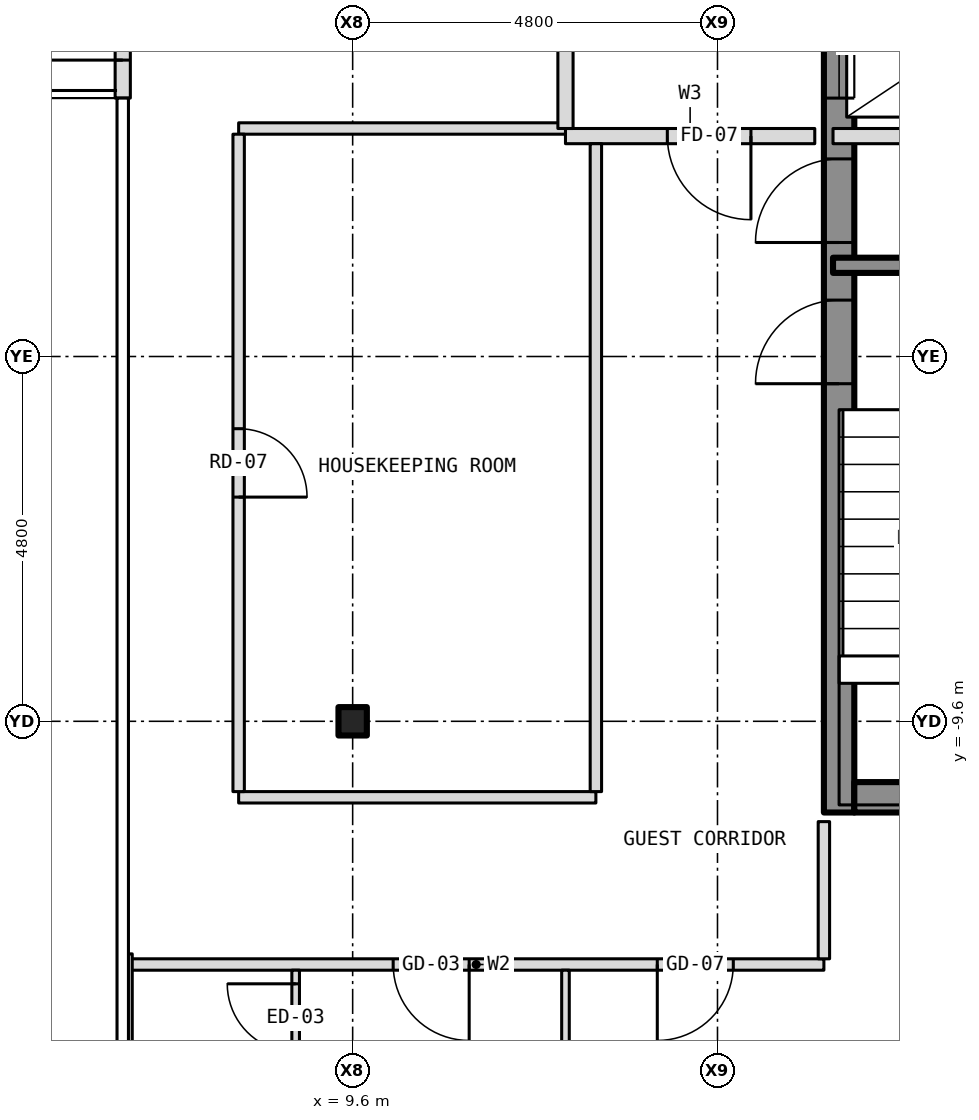
"""IFC4 building model, lengths in metres.
Left out: names, types, materials, properties, quantities, classifications, styles, units other than length and angle.
Written with IfcOpenShell. Run it as: python <this file> out.ifc"""

import sys

from ifc_helpers import new_model, si_unit, direction, frame, frame_2d, origin, origin_2d, place, context, subcontext, project, spatial, rectangle, i_section, extrude, element, fill, save


model = new_model("IFC4")
c1 = context("Model", 3, precision=1e-05, world=origin(), true_north=direction((0.0, 1.0)))
c2 = subcontext(c1, "Body", "Model", "MODEL_VIEW")
j1 = project(units=[si_unit("LENGTHUNIT", "METRE"), si_unit("PLANEANGLEUNIT", "RADIAN")], contexts=[c1])
p1 = place(None, origin())
s1 = spatial("IfcSite", under=j1, at=p1, CompositionType="ELEMENT")
p2 = place(p1, origin())
s2 = spatial("IfcBuilding", under=s1, at=p2, CompositionType="ELEMENT")
p3 = place(p2, frame((0.0, 0.0, 222.5)))
s3 = spatial("IfcBuildingStorey", under=s2, at=p3, CompositionType="ELEMENT", Elevation=222.5)
p4 = place(p3, frame((9.6, -9.6, -0.15), z_axis=(0.0, 0.0, 1.0), x_axis=(1.0, 0.0, 0.0)))
e1 = element("IfcColumn", 1, at=p4, inside=s3, PredefinedType="COLUMN", context=c2, shape_type="SweptSolid", body=[
    extrude(i_section(OverallWidth=0.373, OverallDepth=0.373, WebThickness=0.016, FlangeThickness=0.026, at=origin_2d()), origin(), (0.0, 0.0, 1.0), 3.5),
])
p5 = place(p3, frame((16.0, -10.8, 0.0), z_axis=(0.0, 0.0, 1.0), x_axis=(0.0, 1.0, 0.0)))
e2 = element("IfcWall", 2, at=p5, inside=s3, PredefinedType="SHEAR", context=c2, shape_type="SweptSolid", body=[
    extrude(rectangle(XDim=21.6, YDim=0.4, at=frame_2d((10.8, 0.0))), origin(), (0.0, 0.0, 1.0), 3.25),
])
p6 = place(p5, frame((9.4, 0.0, 0.0)))
e3 = element("IfcOpeningElement", 3, at=p6, cuts=e2, PredefinedType="OPENING", context=c2, shape_type="SweptSolid", body=[
    extrude(rectangle(XDim=1.1, YDim=2.1, at=frame_2d((0.55, 1.05))), frame((0.0, 0.212, 0.0), z_axis=(0.0, -1.0, 0.0), x_axis=(1.0, 0.0, 0.0)), (0.0, 0.0, 1.0), 0.424),
])
p7 = place(p5, frame((11.5, 0.0, 0.0)))
e4 = element("IfcOpeningElement", 4, at=p7, cuts=e2, PredefinedType="OPENING", context=c2, shape_type="SweptSolid", body=[
    extrude(rectangle(XDim=1.1, YDim=2.1, at=frame_2d((0.55, 1.05))), frame((0.0, 0.212, 0.0), z_axis=(0.0, -1.0, 0.0), x_axis=(1.0, 0.0, 0.0)), (0.0, 0.0, 1.0), 0.424),
])
p8 = place(p5, frame((13.6, 0.0, 0.0)))
e5 = element("IfcOpeningElement", 5, at=p8, cuts=e2, PredefinedType="OPENING", context=c2, shape_type="SweptSolid", body=[
    extrude(rectangle(XDim=1.1, YDim=2.1, at=frame_2d((0.55, 1.05))), frame((0.0, 0.212, 0.0), z_axis=(0.0, -1.0, 0.0), x_axis=(1.0, 0.0, 0.0)), (0.0, 0.0, 1.0), 0.424),
])
p9 = place(p5, frame((15.7, 0.0, 0.0)))
e6 = element("IfcOpeningElement", 6, at=p9, cuts=e2, PredefinedType="OPENING", context=c2, shape_type="SweptSolid", body=[
    extrude(rectangle(XDim=1.1, YDim=2.1, at=frame_2d((0.55, 1.05))), frame((0.0, 0.212, 0.0), z_axis=(0.0, -1.0, 0.0), x_axis=(1.0, 0.0, 0.0)), (0.0, 0.0, 1.0), 0.424),
])
p10 = place(p5, frame((17.8, 0.0, 0.0)))
e7 = element("IfcOpeningElement", 7, at=p10, cuts=e2, PredefinedType="OPENING", context=c2, shape_type="SweptSolid", body=[
    extrude(rectangle(XDim=1.1, YDim=2.1, at=frame_2d((0.55, 1.05))), frame((0.0, 0.212, 0.0), z_axis=(0.0, -1.0, 0.0), x_axis=(1.0, 0.0, 0.0)), (0.0, 0.0, 1.0), 0.424),
])
p11 = place(p5, frame((5.642, 0.0, 0.0)))
e8 = element("IfcOpeningElement", 8, at=p11, cuts=e2, PredefinedType="OPENING", context=c2, shape_type="SweptSolid", body=[
    extrude(rectangle(XDim=1.1, YDim=2.1, at=frame_2d((0.55, 1.05))), frame((0.0, 0.212, 0.0), z_axis=(0.0, -1.0, 0.0), x_axis=(1.0, 0.0, 0.0)), (0.0, 0.0, 1.0), 0.424),
])
p12 = place(p5, frame((7.5, 0.0, 0.0)))
e9 = element("IfcOpeningElement", 9, at=p12, cuts=e2, PredefinedType="OPENING", context=c2, shape_type="SweptSolid", body=[
    extrude(rectangle(XDim=1.1, YDim=2.1, at=frame_2d((0.55, 1.05))), frame((0.0, 0.212, 0.0), z_axis=(0.0, -1.0, 0.0), x_axis=(1.0, 0.0, 0.0)), (0.0, 0.0, 1.0), 0.424),
])
p13 = place(p5, frame((20.0, 0.0, 0.0)))
e10 = element("IfcOpeningElement", 10, at=p13, cuts=e2, PredefinedType="OPENING", context=c2, shape_type="SweptSolid", body=[
    extrude(rectangle(XDim=0.9, YDim=2.1, at=frame_2d((0.45, 1.05))), frame((0.0, 0.212, 0.0), z_axis=(0.0, -1.0, 0.0), x_axis=(1.0, 0.0, 0.0)), (0.0, 0.0, 1.0), 0.424),
])
p14 = place(p3, frame((16.2, -10.6, 0.0), z_axis=(0.0, 0.0, 1.0), x_axis=(1.0, 0.0, 0.0)))
e11 = element("IfcWall", 11, at=p14, inside=s3, PredefinedType="SHEAR", context=c2, shape_type="SweptSolid", body=[
    extrude(rectangle(XDim=3.8, YDim=0.4, at=frame_2d((1.9, 0.0))), origin(), (0.0, 0.0, 1.0), 3.25),
])
p15 = place(p3, frame((6.575, -1.4, 0.0), z_axis=(0.0, 0.0, 1.0), x_axis=(0.0, 1.0, 0.0)))
e12 = element("IfcWall", 12, at=p15, inside=s3, PredefinedType="SOLIDWALL", context=c2, shape_type="SweptSolid", body=[
    extrude(rectangle(XDim=2.8, YDim=0.2, at=frame_2d((1.4, 0.0))), origin(), (0.0, 0.0, 1.0), 3.5),
])
p16 = place(p15, frame((0.5, 0.0, 0.0)))
e13 = element("IfcOpeningElement", 13, at=p16, cuts=e12, PredefinedType="OPENING", context=c2, shape_type="SweptSolid", body=[
    extrude(rectangle(XDim=1.8, YDim=2.1, at=frame_2d((0.9, 1.05))), frame((0.0, 0.112, 0.0), z_axis=(0.0, -1.0, 0.0), x_axis=(1.0, 0.0, 0.0)), (0.0, 0.0, 1.0), 0.224),
])
p17 = place(p3, frame((6.65, -12.8, 0.0), z_axis=(0.0, 0.0, 1.0), x_axis=(1.0, 0.0, 0.0)))
e14 = element("IfcWall", 14, at=p17, inside=s3, PredefinedType="PARTITIONING", context=c2, shape_type="SweptSolid", body=[
    extrude(rectangle(XDim=9.15, YDim=0.15, at=frame_2d((4.575, 0.0))), origin(), (0.0, 0.0, 1.0), 3.35),
])
p18 = place(p17, frame((3.483, 0.0, 0.0)))
e15 = element("IfcOpeningElement", 15, at=p18, cuts=e14, PredefinedType="OPENING", context=c2, shape_type="SweptSolid", body=[
    extrude(rectangle(XDim=1.0, YDim=2.1, at=frame_2d((0.5, 1.05))), frame((0.0, 0.087, 0.0), z_axis=(0.0, -1.0, 0.0), x_axis=(1.0, 0.0, 0.0)), (0.0, 0.0, 1.0), 0.174),
])
p19 = place(p17, frame((6.958, 0.0, 0.0)))
e16 = element("IfcOpeningElement", 16, at=p19, cuts=e14, PredefinedType="OPENING", context=c2, shape_type="SweptSolid", body=[
    extrude(rectangle(XDim=1.0, YDim=2.1, at=frame_2d((0.5, 1.05))), frame((0.0, 0.087, 0.0), z_axis=(0.0, -1.0, 0.0), x_axis=(1.0, 0.0, 0.0)), (0.0, 0.0, 1.0), 0.174),
])
p20 = place(p3, frame((8.1, -10.6, 0.0), z_axis=(0.0, 0.0, 1.0), x_axis=(1.0, 0.0, 0.0)))
e17 = element("IfcWall", 17, at=p20, inside=s3, PredefinedType="PARTITIONING", context=c2, shape_type="SweptSolid", body=[
    extrude(rectangle(XDim=4.7, YDim=0.15, at=frame_2d((2.35, 0.0))), origin(), (0.0, 0.0, 1.0), 3.35),
])
p21 = place(p3, frame((15.92, -3.6, 0.0), z_axis=(0.0, 0.0, 1.0), x_axis=(1.0, 0.0, 0.0)))
e18 = element("IfcWall", 18, at=p21, inside=s3, PredefinedType="SHEAR", context=c2, shape_type="SweptSolid", body=[
    extrude(rectangle(XDim=4.36, YDim=0.2, at=frame_2d((2.18, 0.0))), origin(), (0.0, 0.0, 1.0), 3.25),
])
p22 = place(p3, frame((12.4, -1.9, 0.0), z_axis=(0.0, 0.0, 1.0), x_axis=(1.0, 0.0, 0.0)))
e19 = element("IfcWall", 19, at=p22, inside=s3, PredefinedType="PARTITIONING", context=c2, shape_type="SweptSolid", body=[
    extrude(rectangle(XDim=3.28, YDim=0.2, at=frame_2d((1.64, 0.0))), origin(), (0.0, 0.0, 1.0), 3.35),
])
p23 = place(p22, frame((1.34, 0.0, 0.0)))
e20 = element("IfcOpeningElement", 20, at=p23, cuts=e19, PredefinedType="OPENING", context=c2, shape_type="SweptSolid", body=[
    extrude(rectangle(XDim=1.1, YDim=2.1, at=frame_2d((0.55, 1.05))), frame((0.0, 0.112, 0.0), z_axis=(0.0, -1.0, 0.0), x_axis=(1.0, 0.0, 0.0)), (0.0, 0.0, 1.0), 0.224),
])
p24 = place(p3, frame((15.92, -1.9, 0.0), z_axis=(0.0, 0.0, 1.0), x_axis=(1.0, 0.0, 0.0)))
e21 = element("IfcWall", 21, at=p24, inside=s3, PredefinedType="PARTITIONING", context=c2, shape_type="SweptSolid", body=[
    extrude(rectangle(XDim=4.36, YDim=0.2, at=frame_2d((2.18, 0.0))), origin(), (0.0, 0.0, 1.0), 3.25),
])
p25 = place(p24, frame((3.18, 0.0, 0.0)))
e22 = element("IfcOpeningElement", 22, at=p25, cuts=e21, PredefinedType="OPENING", context=c2, shape_type="SweptSolid", body=[
    extrude(rectangle(XDim=0.9, YDim=2.1, at=frame_2d((0.45, 1.05))), frame((0.0, 0.112, 0.0), z_axis=(0.0, -1.0, 0.0), x_axis=(1.0, 0.0, 0.0)), (0.0, 0.0, 1.0), 0.224),
])
p26 = place(p3, frame((8.1, -1.8, 0.0), z_axis=(0.0, 0.0, 1.0), x_axis=(1.0, 0.0, 0.0)))
e23 = element("IfcWall", 23, at=p26, inside=s3, PredefinedType="PARTITIONING", context=c2, shape_type="SweptSolid", body=[
    extrude(rectangle(XDim=4.3, YDim=0.15, at=frame_2d((2.15, 0.0))), origin(), (0.0, 0.0, 1.0), 3.35),
])
p27 = place(p3, frame((6.65, -16.14, 0.0), z_axis=(0.0, 0.0, 1.0), x_axis=(0.0, 1.0, 0.0)))
e24 = element("IfcWall", 24, at=p27, inside=s3, PredefinedType="PARTITIONING", context=c2, shape_type="SweptSolid", body=[
    extrude(rectangle(XDim=3.48, YDim=0.1, at=frame_2d((1.74, 0.0))), origin(), (0.0, 0.0, 1.0), 3.35),
])
p28 = place(p3, frame((8.1, -10.525, 0.0), z_axis=(0.0, 0.0, 1.0), x_axis=(0.0, 1.0, 0.0)))
e25 = element("IfcWall", 25, at=p28, inside=s3, PredefinedType="PARTITIONING", context=c2, shape_type="SweptSolid", body=[
    extrude(rectangle(XDim=8.65, YDim=0.15, at=frame_2d((4.325, 0.0))), origin(), (0.0, 0.0, 1.0), 3.35),
])
p29 = place(p28, frame((3.875, 0.0, 0.0)))
e26 = element("IfcOpeningElement", 26, at=p29, cuts=e25, PredefinedType="OPENING", context=c2, shape_type="SweptSolid", body=[
    extrude(rectangle(XDim=0.9, YDim=2.1, at=frame_2d((0.45, 1.05))), frame((0.0, 0.087, 0.0), z_axis=(0.0, -1.0, 0.0), x_axis=(1.0, 0.0, 0.0)), (0.0, 0.0, 1.0), 0.174),
])
p30 = place(p3, frame((8.85, -15.95, 0.0), z_axis=(0.0, 0.0, 1.0), x_axis=(0.0, 1.0, 0.0)))
e27 = element("IfcWall", 27, at=p30, inside=s3, PredefinedType="PARTITIONING", context=c2, shape_type="SweptSolid", body=[
    extrude(rectangle(XDim=3.075, YDim=0.1, at=frame_2d((1.538, 0.0))), origin(), (0.0, 0.0, 1.0), 3.35),
])
p31 = place(p30, frame((1.996, 0.0, 0.0)))
e28 = element("IfcOpeningElement", 28, at=p31, cuts=e27, PredefinedType="OPENING", context=c2, shape_type="SweptSolid", body=[
    extrude(rectangle(XDim=0.9, YDim=2.1, at=frame_2d((0.45, 1.05))), frame((0.0, 0.062, 0.0), z_axis=(0.0, -1.0, 0.0), x_axis=(1.0, 0.0, 0.0)), (0.0, 0.0, 1.0), 0.124),
])
p32 = place(p3, frame((12.4, -20.78, 0.0), z_axis=(0.0, 0.0, 1.0), x_axis=(0.0, 1.0, 0.0)))
e29 = element("IfcWall", 29, at=p32, inside=s3, PredefinedType="PARTITIONING", context=c2, shape_type="SweptSolid", body=[
    extrude(rectangle(XDim=7.905, YDim=0.1, at=frame_2d((3.953, 0.0))), origin(), (0.0, 0.0, 1.0), 3.35),
])
p33 = place(p3, frame((12.4, -1.8, 0.0), z_axis=(0.0, 0.0, 1.0), x_axis=(0.0, 1.0, 0.0)))
e30 = element("IfcWall", 30, at=p33, inside=s3, PredefinedType="PARTITIONING", context=c2, shape_type="SweptSolid", body=[
    extrude(rectangle(XDim=4.0, YDim=0.2, at=frame_2d((2.0, 0.0))), origin(), (0.0, 0.0, 1.0), 3.35),
])
p34 = place(p33, frame((1.25, 0.0, 0.0)))
e31 = element("IfcOpeningElement", 31, at=p34, cuts=e30, PredefinedType="OPENING", context=c2, shape_type="SweptSolid", body=[
    extrude(rectangle(XDim=1.1, YDim=2.1, at=frame_2d((0.55, 1.05))), frame((0.0, 0.112, 0.0), z_axis=(0.0, -1.0, 0.0), x_axis=(1.0, 0.0, 0.0)), (0.0, 0.0, 1.0), 0.224),
])
p35 = place(p3, frame((12.8, -10.525, 0.0), z_axis=(0.0, 0.0, 1.0), x_axis=(0.0, 1.0, 0.0)))
e32 = element("IfcWall", 32, at=p35, inside=s3, PredefinedType="PARTITIONING", context=c2, shape_type="SweptSolid", body=[
    extrude(rectangle(XDim=8.525, YDim=0.15, at=frame_2d((4.262, 0.0))), origin(), (0.0, 0.0, 1.0), 3.35),
])
p36 = place(p3, frame((15.8, -12.725, 0.0), z_axis=(0.0, 0.0, 1.0), x_axis=(0.0, 1.0, 0.0)))
e33 = element("IfcWall", 33, at=p36, inside=s3, PredefinedType="PARTITIONING", context=c2, shape_type="SweptSolid", body=[
    extrude(rectangle(XDim=1.805, YDim=0.15, at=frame_2d((0.903, 0.0))), origin(), (0.0, 0.0, 1.0), 3.35),
])
p37 = place(p16, origin())
e34 = element("IfcDoor", 34, at=p37, inside=s3, OperationType="DOUBLE_DOOR_DOUBLE_SWING", PredefinedType="DOOR", context=c2, shape_type="SweptSolid", body=[
    extrude(rectangle(XDim=1.8, YDim=2.1, at=frame_2d((0.9, 1.05))), frame((0.0, 0.025, 0.0), z_axis=(0.0, -1.0, 0.0), x_axis=(1.0, 0.0, 0.0)), (0.0, 0.0, 1.0), 0.05),
])
fill(e13, e34)
p38 = place(p6, origin())
e35 = element("IfcDoor", 35, at=p38, inside=s3, OperationType="SLIDING_TO_LEFT", PredefinedType="DOOR", context=c2, shape_type="SweptSolid", body=[
    extrude(rectangle(XDim=1.1, YDim=2.1, at=frame_2d((0.55, 1.05))), frame((0.0, 0.025, 0.0), z_axis=(0.0, -1.0, 0.0), x_axis=(1.0, 0.0, 0.0)), (0.0, 0.0, 1.0), 0.05),
])
fill(e3, e35)
p39 = place(p11, origin())
e36 = element("IfcDoor", 36, at=p39, inside=s3, OperationType="SINGLE_SWING_LEFT", PredefinedType="DOOR", context=c2, shape_type="SweptSolid", body=[
    extrude(rectangle(XDim=1.1, YDim=2.1, at=frame_2d((0.55, 1.05))), frame((0.0, 0.025, 0.0), z_axis=(0.0, -1.0, 0.0), x_axis=(1.0, 0.0, 0.0)), (0.0, 0.0, 1.0), 0.05),
])
fill(e8, e36)
p40 = place(p12, origin())
e37 = element("IfcDoor", 37, at=p40, inside=s3, OperationType="SINGLE_SWING_LEFT", PredefinedType="DOOR", context=c2, shape_type="SweptSolid", body=[
    extrude(rectangle(XDim=1.1, YDim=2.1, at=frame_2d((0.55, 1.05))), frame((0.0, 0.025, 0.0), z_axis=(0.0, -1.0, 0.0), x_axis=(1.0, 0.0, 0.0)), (0.0, 0.0, 1.0), 0.05),
])
fill(e9, e37)
p41 = place(p23, origin())
e38 = element("IfcDoor", 38, at=p41, inside=s3, OperationType="SINGLE_SWING_RIGHT", PredefinedType="DOOR", context=c2, shape_type="SweptSolid", body=[
    extrude(rectangle(XDim=1.1, YDim=2.1, at=frame_2d((0.55, 1.05))), frame((0.0, 0.025, 0.0), z_axis=(0.0, -1.0, 0.0), x_axis=(1.0, 0.0, 0.0)), (0.0, 0.0, 1.0), 0.05),
])
fill(e20, e38)
p42 = place(p18, origin())
e39 = element("IfcDoor", 39, at=p42, inside=s3, OperationType="SINGLE_SWING_RIGHT", PredefinedType="DOOR", context=c2, shape_type="SweptSolid", body=[
    extrude(rectangle(XDim=1.0, YDim=2.1, at=frame_2d((0.5, 1.05))), frame((0.0, 0.025, 0.0), z_axis=(0.0, -1.0, 0.0), x_axis=(1.0, 0.0, 0.0)), (0.0, 0.0, 1.0), 0.05),
])
fill(e15, e39)
p43 = place(p31, origin())
e40 = element("IfcDoor", 40, at=p43, inside=s3, OperationType="SINGLE_SWING_RIGHT", PredefinedType="DOOR", context=c2, shape_type="SweptSolid", body=[
    extrude(rectangle(XDim=0.9, YDim=2.1, at=frame_2d((0.45, 1.05))), frame((0.0, 0.025, 0.0), z_axis=(0.0, -1.0, 0.0), x_axis=(1.0, 0.0, 0.0)), (0.0, 0.0, 1.0), 0.05),
])
fill(e28, e40)
p44 = place(p19, origin())
e41 = element("IfcDoor", 41, at=p44, inside=s3, OperationType="SINGLE_SWING_LEFT", PredefinedType="DOOR", context=c2, shape_type="SweptSolid", body=[
    extrude(rectangle(XDim=1.0, YDim=2.1, at=frame_2d((0.5, 1.05))), frame((0.0, 0.025, 0.0), z_axis=(0.0, -1.0, 0.0), x_axis=(1.0, 0.0, 0.0)), (0.0, 0.0, 1.0), 0.05),
])
fill(e16, e41)
p45 = place(p29, origin())
e42 = element("IfcDoor", 42, at=p45, inside=s3, OperationType="SINGLE_SWING_LEFT", PredefinedType="DOOR", context=c2, shape_type="SweptSolid", body=[
    extrude(rectangle(XDim=0.9, YDim=2.1, at=frame_2d((0.45, 1.05))), frame((0.0, 0.025, 0.0), z_axis=(0.0, -1.0, 0.0), x_axis=(1.0, 0.0, 0.0)), (0.0, 0.0, 1.0), 0.05),
])
fill(e26, e42)
save(model, sys.argv[1])
